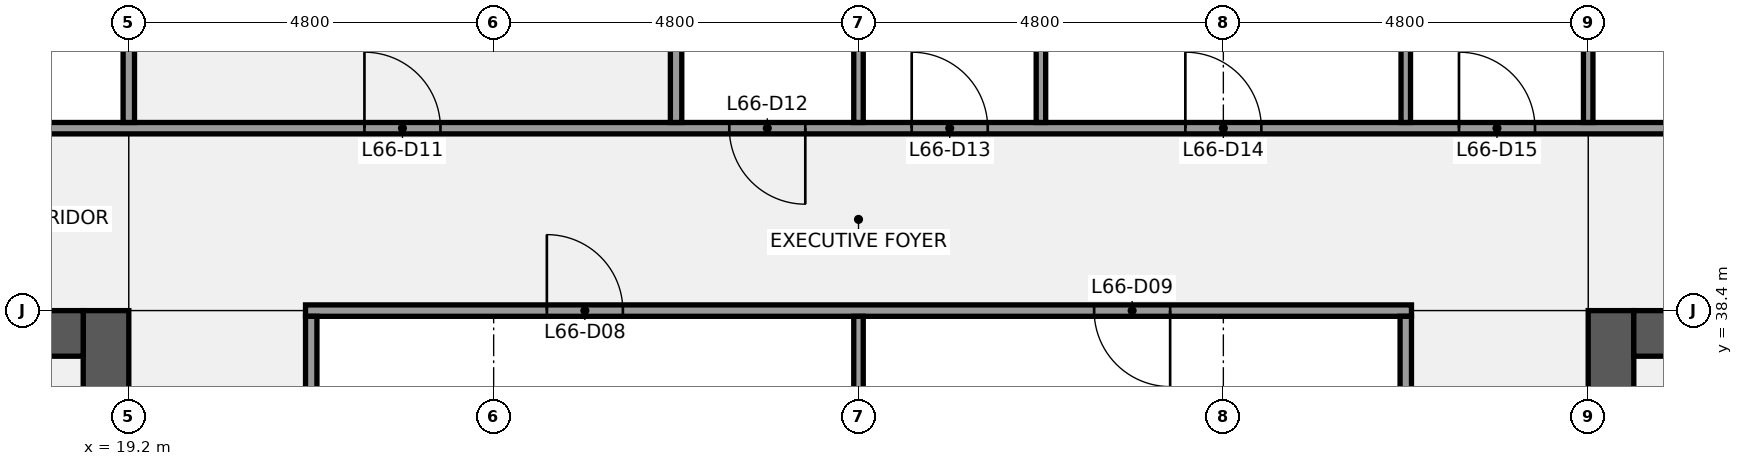
"""IFC4 building model, lengths in metres.
Left out: names, types, materials, properties, quantities, classifications, styles, units other than length and angle.
Written with IfcOpenShell. Run it as: python <this file> out.ifc"""

import sys

from ifc_helpers import new_model, si_unit, direction, frame, frame_2d, origin, place, context, subcontext, project, spatial, rectangle, extrude, element, fill, save


model = new_model("IFC4")
c1 = context("Model", 3, precision=1e-05, world=origin(), true_north=direction((0.0, 1.0)))
c2 = subcontext(c1, "Body", "Model", "MODEL_VIEW")
j1 = project(units=[si_unit("LENGTHUNIT", "METRE"), si_unit("PLANEANGLEUNIT", "RADIAN")], contexts=[c1])
p1 = place(None, origin())
s1 = spatial("IfcSite", under=j1, at=p1, CompositionType="ELEMENT")
p2 = place(p1, origin())
s2 = spatial("IfcBuilding", under=s1, at=p2, CompositionType="ELEMENT")
p3 = place(p2, frame((0.0, 0.0, 302.3)))
s3 = spatial("IfcBuildingStorey", under=s2, at=p3, CompositionType="ELEMENT", Elevation=302.3)
p4 = place(p3, frame((18.9, 38.4, 0.0), z_axis=(0.0, 0.0, 1.0), x_axis=(0.0, -1.0, 0.0)))
e1 = element("IfcWall", 1, at=p4, inside=s3, PredefinedType="SHEAR", context=c2, shape_type="SweptSolid", body=[
    extrude(rectangle(XDim=28.8, YDim=0.6, at=frame_2d((14.4, 0.0))), origin(), (0.0, 0.0, 1.0), 3.84),
])
p5 = place(p4, frame((18.3, 0.0, 0.0)))
e2 = element("IfcOpeningElement", 2, at=p5, cuts=e1, PredefinedType="OPENING", context=c2, shape_type="SweptSolid", body=[
    extrude(rectangle(XDim=1.8, YDim=2.1, at=frame_2d((0.9, 1.05))), frame((0.0, 0.31, 0.0), z_axis=(0.0, -1.0, 0.0), x_axis=(1.0, 0.0, 0.0)), (0.0, 0.0, 1.0), 0.62),
])
p6 = place(p4, frame((8.7, 0.0, 0.0)))
e3 = element("IfcOpeningElement", 3, at=p6, cuts=e1, PredefinedType="OPENING", context=c2, shape_type="SweptSolid", body=[
    extrude(rectangle(XDim=1.8, YDim=2.1, at=frame_2d((0.9, 1.05))), frame((0.0, 0.31, 0.0), z_axis=(0.0, -1.0, 0.0), x_axis=(1.0, 0.0, 0.0)), (0.0, 0.0, 1.0), 0.62),
])
p7 = place(p3, frame((14.4, 38.1, 0.0), z_axis=(0.0, 0.0, 1.0), x_axis=(1.0, 0.0, 0.0)))
e4 = element("IfcWall", 4, at=p7, inside=s3, PredefinedType="SHEAR", context=c2, shape_type="SweptSolid", body=[
    extrude(rectangle(XDim=4.2, YDim=0.6, at=frame_2d((2.1, 0.0))), origin(), (0.0, 0.0, 1.0), 3.84),
])
p8 = place(p7, frame((1.85, 0.0, 0.0)))
e5 = element("IfcOpeningElement", 5, at=p8, cuts=e4, PredefinedType="OPENING", context=c2, shape_type="SweptSolid", body=[
    extrude(rectangle(XDim=1.1, YDim=2.1, at=frame_2d((0.55, 1.05))), frame((0.0, 0.31, 0.0), z_axis=(0.0, -1.0, 0.0), x_axis=(1.0, 0.0, 0.0)), (0.0, 0.0, 1.0), 0.62),
])
p9 = place(p3, frame((38.7, 9.6, 0.0), z_axis=(0.0, 0.0, 1.0), x_axis=(0.0, 1.0, 0.0)))
e6 = element("IfcWall", 6, at=p9, inside=s3, PredefinedType="SHEAR", context=c2, shape_type="SweptSolid", body=[
    extrude(rectangle(XDim=28.8, YDim=0.6, at=frame_2d((14.4, 0.0))), origin(), (0.0, 0.0, 1.0), 3.84),
])
p10 = place(p9, frame((8.7, 0.0, 0.0)))
e7 = element("IfcOpeningElement", 7, at=p10, cuts=e6, PredefinedType="OPENING", context=c2, shape_type="SweptSolid", body=[
    extrude(rectangle(XDim=1.8, YDim=2.1, at=frame_2d((0.9, 1.05))), frame((0.0, 0.31, 0.0), z_axis=(0.0, -1.0, 0.0), x_axis=(1.0, 0.0, 0.0)), (0.0, 0.0, 1.0), 0.62),
])
p11 = place(p9, frame((18.3, 0.0, 0.0)))
e8 = element("IfcOpeningElement", 8, at=p11, cuts=e6, PredefinedType="OPENING", context=c2, shape_type="SweptSolid", body=[
    extrude(rectangle(XDim=1.8, YDim=2.1, at=frame_2d((0.9, 1.05))), frame((0.0, 0.31, 0.0), z_axis=(0.0, -1.0, 0.0), x_axis=(1.0, 0.0, 0.0)), (0.0, 0.0, 1.0), 0.62),
])
p12 = place(p3, frame((39.0, 38.1, 0.0), z_axis=(0.0, 0.0, 1.0), x_axis=(1.0, 0.0, 0.0)))
e9 = element("IfcWall", 9, at=p12, inside=s3, PredefinedType="SHEAR", context=c2, shape_type="SweptSolid", body=[
    extrude(rectangle(XDim=4.2, YDim=0.6, at=frame_2d((2.1, 0.0))), origin(), (0.0, 0.0, 1.0), 3.84),
])
p13 = place(p12, frame((1.25, 0.0, 0.0)))
e10 = element("IfcOpeningElement", 10, at=p13, cuts=e9, PredefinedType="OPENING", context=c2, shape_type="SweptSolid", body=[
    extrude(rectangle(XDim=1.1, YDim=2.1, at=frame_2d((0.55, 1.05))), frame((0.0, 0.31, 0.0), z_axis=(0.0, -1.0, 0.0), x_axis=(1.0, 0.0, 0.0)), (0.0, 0.0, 1.0), 0.62),
])
p14 = place(p3, frame((21.525, 38.4, 0.0), z_axis=(0.0, 0.0, 1.0), x_axis=(1.0, 0.0, 0.0)))
e11 = element("IfcWall", 11, at=p14, inside=s3, PredefinedType="PARTITIONING", context=c2, shape_type="SweptSolid", body=[
    extrude(rectangle(XDim=14.55, YDim=0.15, at=frame_2d((7.275, 0.0))), origin(), (0.0, 0.0, 1.0), 2.87),
])
p15 = place(p14, frame((3.175, 0.0, 0.0)))
e12 = element("IfcOpeningElement", 12, at=p15, cuts=e11, PredefinedType="OPENING", context=c2, shape_type="SweptSolid", body=[
    extrude(rectangle(XDim=1.0, YDim=2.1, at=frame_2d((0.5, 1.05))), frame((0.0, 0.085, 0.0), z_axis=(0.0, -1.0, 0.0), x_axis=(1.0, 0.0, 0.0)), (0.0, 0.0, 1.0), 0.17),
])
p16 = place(p14, frame((10.375, 0.0, 0.0)))
e13 = element("IfcOpeningElement", 13, at=p16, cuts=e11, PredefinedType="OPENING", context=c2, shape_type="SweptSolid", body=[
    extrude(rectangle(XDim=1.0, YDim=2.1, at=frame_2d((0.5, 1.05))), frame((0.0, 0.085, 0.0), z_axis=(0.0, -1.0, 0.0), x_axis=(1.0, 0.0, 0.0)), (0.0, 0.0, 1.0), 0.17),
])
p17 = place(p3, frame((14.5, 40.8, 0.0), z_axis=(0.0, 0.0, 1.0), x_axis=(1.0, 0.0, 0.0)))
e14 = element("IfcWall", 14, at=p17, inside=s3, PredefinedType="PARTITIONING", context=c2, shape_type="SweptSolid", body=[
    extrude(rectangle(XDim=28.6, YDim=0.15, at=frame_2d((14.3, 0.0))), origin(), (0.0, 0.0, 1.0), 2.87),
])
p18 = place(p17, frame((1.85, 0.0, 0.0)))
e15 = element("IfcOpeningElement", 15, at=p18, cuts=e14, PredefinedType="OPENING", context=c2, shape_type="SweptSolid", body=[
    extrude(rectangle(XDim=1.0, YDim=2.1, at=frame_2d((0.5, 1.05))), frame((0.0, 0.085, 0.0), z_axis=(0.0, -1.0, 0.0), x_axis=(1.0, 0.0, 0.0)), (0.0, 0.0, 1.0), 0.17),
])
p19 = place(p17, frame((7.8, 0.0, 0.0)))
e16 = element("IfcOpeningElement", 16, at=p19, cuts=e14, PredefinedType="OPENING", context=c2, shape_type="SweptSolid", body=[
    extrude(rectangle(XDim=1.0, YDim=2.1, at=frame_2d((0.5, 1.05))), frame((0.0, 0.085, 0.0), z_axis=(0.0, -1.0, 0.0), x_axis=(1.0, 0.0, 0.0)), (0.0, 0.0, 1.0), 0.17),
])
p20 = place(p17, frame((12.6, 0.0, 0.0)))
e17 = element("IfcOpeningElement", 17, at=p20, cuts=e14, PredefinedType="OPENING", context=c2, shape_type="SweptSolid", body=[
    extrude(rectangle(XDim=1.0, YDim=2.1, at=frame_2d((0.5, 1.05))), frame((0.0, 0.085, 0.0), z_axis=(0.0, -1.0, 0.0), x_axis=(1.0, 0.0, 0.0)), (0.0, 0.0, 1.0), 0.17),
])
p21 = place(p17, frame((15.0, 0.0, 0.0)))
e18 = element("IfcOpeningElement", 18, at=p21, cuts=e14, PredefinedType="OPENING", context=c2, shape_type="SweptSolid", body=[
    extrude(rectangle(XDim=1.0, YDim=2.1, at=frame_2d((0.5, 1.05))), frame((0.0, 0.085, 0.0), z_axis=(0.0, -1.0, 0.0), x_axis=(1.0, 0.0, 0.0)), (0.0, 0.0, 1.0), 0.17),
])
p22 = place(p17, frame((18.6, 0.0, 0.0)))
e19 = element("IfcOpeningElement", 19, at=p22, cuts=e14, PredefinedType="OPENING", context=c2, shape_type="SweptSolid", body=[
    extrude(rectangle(XDim=1.0, YDim=2.1, at=frame_2d((0.5, 1.05))), frame((0.0, 0.085, 0.0), z_axis=(0.0, -1.0, 0.0), x_axis=(1.0, 0.0, 0.0)), (0.0, 0.0, 1.0), 0.17),
])
p23 = place(p17, frame((22.2, 0.0, 0.0)))
e20 = element("IfcOpeningElement", 20, at=p23, cuts=e14, PredefinedType="OPENING", context=c2, shape_type="SweptSolid", body=[
    extrude(rectangle(XDim=1.0, YDim=2.1, at=frame_2d((0.5, 1.05))), frame((0.0, 0.085, 0.0), z_axis=(0.0, -1.0, 0.0), x_axis=(1.0, 0.0, 0.0)), (0.0, 0.0, 1.0), 0.17),
])
p24 = place(p17, frame((25.75, 0.0, 0.0)))
e21 = element("IfcOpeningElement", 21, at=p24, cuts=e14, PredefinedType="OPENING", context=c2, shape_type="SweptSolid", body=[
    extrude(rectangle(XDim=1.0, YDim=2.1, at=frame_2d((0.5, 1.05))), frame((0.0, 0.085, 0.0), z_axis=(0.0, -1.0, 0.0), x_axis=(1.0, 0.0, 0.0)), (0.0, 0.0, 1.0), 0.17),
])
p25 = place(p3, frame((19.2, 40.875, 0.0), z_axis=(0.0, 0.0, 1.0), x_axis=(0.0, 1.0, 0.0)))
e22 = element("IfcWall", 22, at=p25, inside=s3, PredefinedType="PARTITIONING", context=c2, shape_type="SweptSolid", body=[
    extrude(rectangle(XDim=2.225, YDim=0.15, at=frame_2d((1.113, 0.0))), origin(), (0.0, 0.0, 1.0), 2.87),
])
p26 = place(p3, frame((21.6, 33.675, 0.0), z_axis=(0.0, 0.0, 1.0), x_axis=(0.0, 1.0, 0.0)))
e23 = element("IfcWall", 23, at=p26, inside=s3, PredefinedType="PARTITIONING", context=c2, shape_type="SweptSolid", body=[
    extrude(rectangle(XDim=4.65, YDim=0.15, at=frame_2d((2.325, 0.0))), origin(), (0.0, 0.0, 1.0), 2.87),
])
p27 = place(p3, frame((26.4, 40.875, 0.0), z_axis=(0.0, 0.0, 1.0), x_axis=(0.0, 1.0, 0.0)))
e24 = element("IfcWall", 24, at=p27, inside=s3, PredefinedType="PARTITIONING", context=c2, shape_type="SweptSolid", body=[
    extrude(rectangle(XDim=3.45, YDim=0.15, at=frame_2d((1.725, 0.0))), origin(), (0.0, 0.0, 1.0), 2.87),
])
p28 = place(p3, frame((28.8, 33.663, 0.0), z_axis=(0.0, 0.0, 1.0), x_axis=(0.0, 1.0, 0.0)))
e25 = element("IfcWall", 25, at=p28, inside=s3, PredefinedType="PARTITIONING", context=c2, shape_type="SweptSolid", body=[
    extrude(rectangle(XDim=4.662, YDim=0.125, at=frame_2d((2.331, 0.0))), origin(), (0.0, 0.0, 1.0), 2.87),
])
p29 = place(p3, frame((28.8, 40.875, 0.0), z_axis=(0.0, 0.0, 1.0), x_axis=(0.0, 1.0, 0.0)))
e26 = element("IfcWall", 26, at=p29, inside=s3, PredefinedType="PARTITIONING", context=c2, shape_type="SweptSolid", body=[
    extrude(rectangle(XDim=6.625, YDim=0.125, at=frame_2d((3.312, 0.0))), origin(), (0.0, 0.0, 1.0), 2.87),
])
for number, where, z_axis, x_axis in (
    (27, (31.2, 40.875, 0.0), (0.0, 0.0, 1.0), (0.0, 1.0, 0.0)),
    (28, (36.0, 40.875, 0.0), (0.0, 0.0, 1.0), (0.0, 1.0, 0.0)),
):
    element("IfcWall", number, at=place(p3, frame(where, z_axis=z_axis, x_axis=x_axis)), inside=s3, PredefinedType="PARTITIONING", context=c2, shape_type="SweptSolid", body=[
        extrude(rectangle(XDim=7.025, YDim=0.125, at=frame_2d((3.512, 0.0))), origin(), (0.0, 0.0, 1.0), 2.87),
    ])
p30 = place(p3, frame((36.0, 33.675, 0.0), z_axis=(0.0, 0.0, 1.0), x_axis=(0.0, 1.0, 0.0)))
e29 = element("IfcWall", 29, at=p30, inside=s3, PredefinedType="PARTITIONING", context=c2, shape_type="SweptSolid", body=[
    extrude(rectangle(XDim=4.65, YDim=0.15, at=frame_2d((2.325, 0.0))), origin(), (0.0, 0.0, 1.0), 2.87),
])
p31 = place(p3, frame((38.4, 40.875, 0.0), z_axis=(0.0, 0.0, 1.0), x_axis=(0.0, 1.0, 0.0)))
e30 = element("IfcWall", 30, at=p31, inside=s3, PredefinedType="PARTITIONING", context=c2, shape_type="SweptSolid", body=[
    extrude(rectangle(XDim=2.225, YDim=0.125, at=frame_2d((1.113, 0.0))), origin(), (0.0, 0.0, 1.0), 2.87),
])
p32 = place(p15, origin())
e31 = element("IfcDoor", 31, at=p32, inside=s3, OperationType="SINGLE_SWING_LEFT", PredefinedType="DOOR", context=c2, shape_type="SweptSolid", body=[
    extrude(rectangle(XDim=1.0, YDim=2.1, at=frame_2d((0.5, 1.05))), frame((0.0, 0.025, 0.0), z_axis=(0.0, -1.0, 0.0), x_axis=(1.0, 0.0, 0.0)), (0.0, 0.0, 1.0), 0.05),
])
fill(e12, e31)
p33 = place(p16, origin())
e32 = element("IfcDoor", 32, at=p33, inside=s3, OperationType="SINGLE_SWING_RIGHT", PredefinedType="DOOR", context=c2, shape_type="SweptSolid", body=[
    extrude(rectangle(XDim=1.0, YDim=2.1, at=frame_2d((0.5, 1.05))), frame((0.0, 0.025, 0.0), z_axis=(0.0, -1.0, 0.0), x_axis=(1.0, 0.0, 0.0)), (0.0, 0.0, 1.0), 0.05),
])
fill(e13, e32)
p34 = place(p19, origin())
e33 = element("IfcDoor", 33, at=p34, inside=s3, OperationType="SINGLE_SWING_LEFT", PredefinedType="DOOR", context=c2, shape_type="SweptSolid", body=[
    extrude(rectangle(XDim=1.0, YDim=2.1, at=frame_2d((0.5, 1.05))), frame((0.0, 0.025, 0.0), z_axis=(0.0, -1.0, 0.0), x_axis=(1.0, 0.0, 0.0)), (0.0, 0.0, 1.0), 0.05),
])
fill(e16, e33)
p35 = place(p20, origin())
e34 = element("IfcDoor", 34, at=p35, inside=s3, OperationType="SINGLE_SWING_RIGHT", PredefinedType="DOOR", context=c2, shape_type="SweptSolid", body=[
    extrude(rectangle(XDim=1.0, YDim=2.1, at=frame_2d((0.5, 1.05))), frame((0.0, 0.025, 0.0), z_axis=(0.0, -1.0, 0.0), x_axis=(1.0, 0.0, 0.0)), (0.0, 0.0, 1.0), 0.05),
])
fill(e17, e34)
p36 = place(p21, origin())
e35 = element("IfcDoor", 35, at=p36, inside=s3, OperationType="SINGLE_SWING_LEFT", PredefinedType="DOOR", context=c2, shape_type="SweptSolid", body=[
    extrude(rectangle(XDim=1.0, YDim=2.1, at=frame_2d((0.5, 1.05))), frame((0.0, 0.025, 0.0), z_axis=(0.0, -1.0, 0.0), x_axis=(1.0, 0.0, 0.0)), (0.0, 0.0, 1.0), 0.05),
])
fill(e18, e35)
p37 = place(p22, origin())
e36 = element("IfcDoor", 36, at=p37, inside=s3, OperationType="SINGLE_SWING_LEFT", PredefinedType="DOOR", context=c2, shape_type="SweptSolid", body=[
    extrude(rectangle(XDim=1.0, YDim=2.1, at=frame_2d((0.5, 1.05))), frame((0.0, 0.025, 0.0), z_axis=(0.0, -1.0, 0.0), x_axis=(1.0, 0.0, 0.0)), (0.0, 0.0, 1.0), 0.05),
])
fill(e19, e36)
p38 = place(p23, origin())
e37 = element("IfcDoor", 37, at=p38, inside=s3, OperationType="SINGLE_SWING_LEFT", PredefinedType="DOOR", context=c2, shape_type="SweptSolid", body=[
    extrude(rectangle(XDim=1.0, YDim=2.1, at=frame_2d((0.5, 1.05))), frame((0.0, 0.025, 0.0), z_axis=(0.0, -1.0, 0.0), x_axis=(1.0, 0.0, 0.0)), (0.0, 0.0, 1.0), 0.05),
])
fill(e20, e37)
save(model, sys.argv[1])
